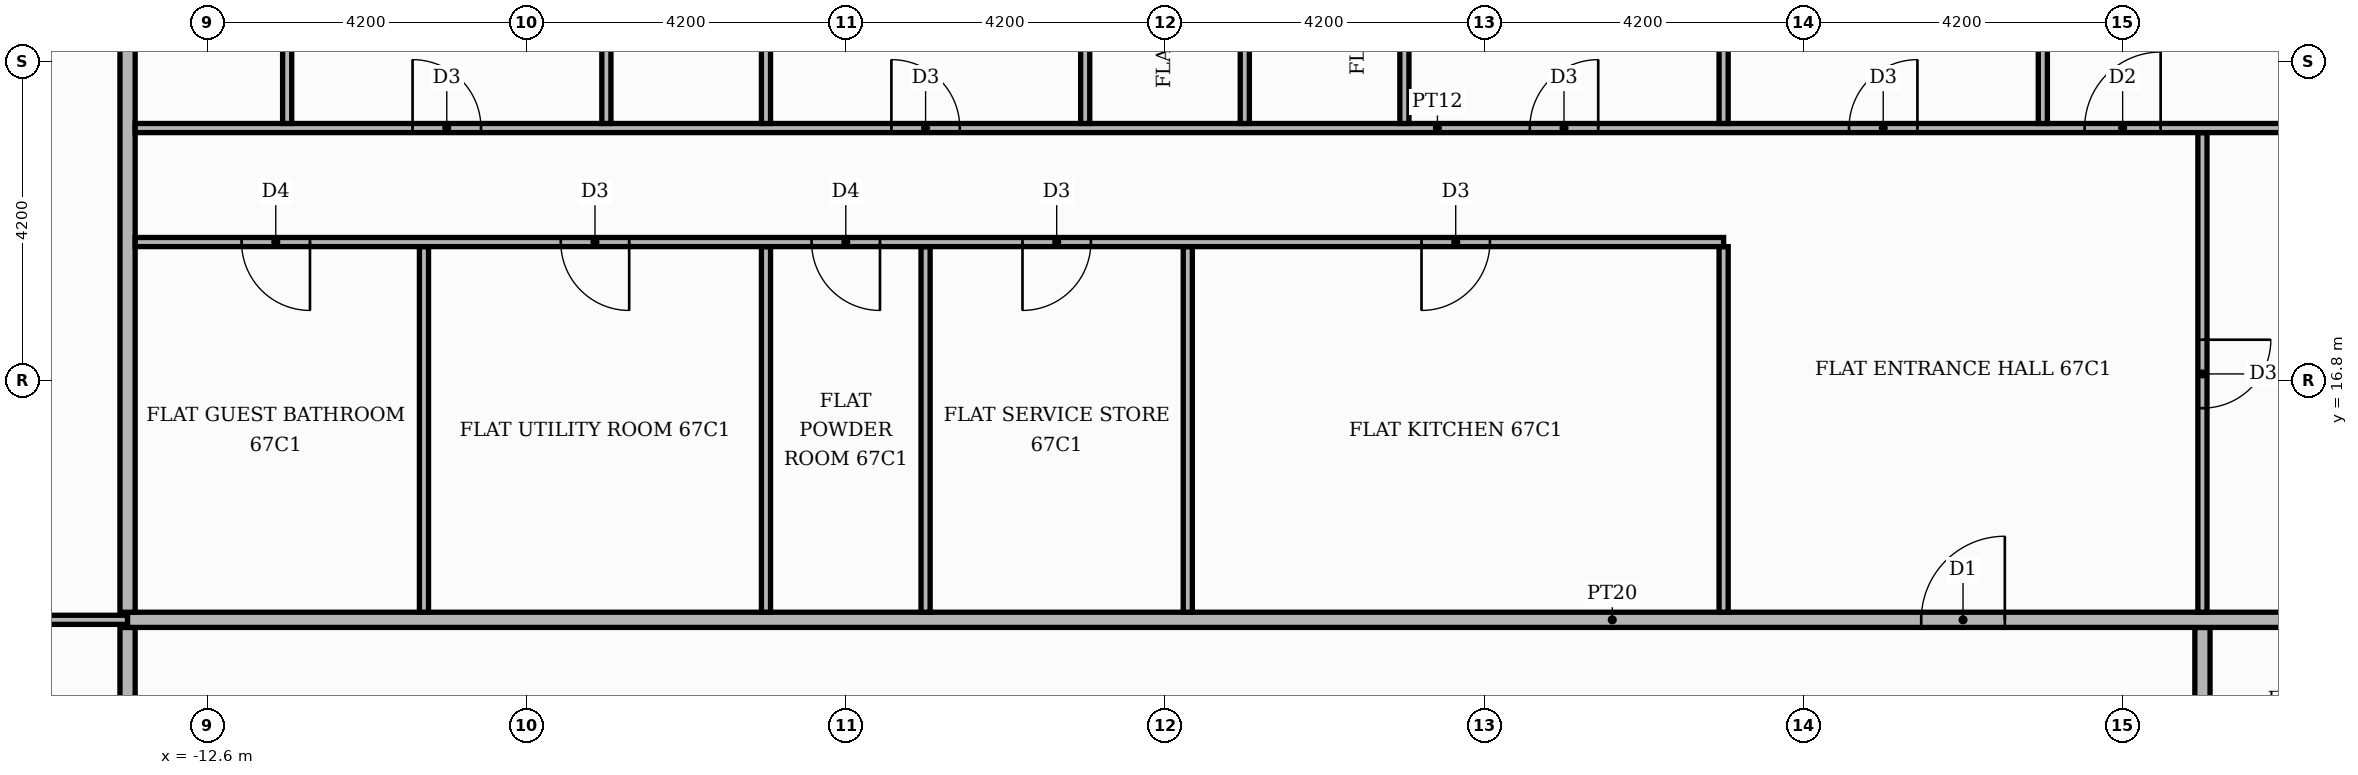
"""IFC4 building model, lengths in metres.
Left out: names, types, materials, properties, quantities, classifications, styles, units other than length and angle.
Written with IfcOpenShell. Run it as: python <this file> out.ifc"""

import sys

from ifc_helpers import new_model, si_unit, direction, frame, frame_2d, origin, place, context, subcontext, project, spatial, rectangle, extrude, element, fill, save


model = new_model("IFC4")
c1 = context("Model", 3, precision=1e-05, world=origin(), true_north=direction((0.0, 1.0)))
c2 = subcontext(c1, "Body", "Model", "MODEL_VIEW")
j1 = project(units=[si_unit("LENGTHUNIT", "METRE"), si_unit("PLANEANGLEUNIT", "RADIAN")], contexts=[c1])
p1 = place(None, origin())
s1 = spatial("IfcSite", under=j1, at=p1, CompositionType="ELEMENT")
p2 = place(p1, origin())
s2 = spatial("IfcBuilding", under=s1, at=p2, CompositionType="ELEMENT")
p3 = place(p2, frame((0.0, 0.0, 279.6)))
s3 = spatial("IfcBuildingStorey", under=s2, at=p3, CompositionType="ELEMENT", Elevation=279.6)
for number, where, z_axis, x_axis in (
    (1, (-13.65, 11.1, 0.0), (0.0, 0.0, 1.0), (0.0, 1.0, 0.0)),
    (2, (13.65, 11.1, 0.0), (0.0, 0.0, 1.0), (0.0, 1.0, 0.0)),
):
    element("IfcWall", number, at=place(p3, frame(where, z_axis=z_axis, x_axis=x_axis)), inside=s3, PredefinedType="PARTITIONING", context=c2, shape_type="SweptSolid", body=[
        extrude(rectangle(XDim=2.45, YDim=0.2, at=frame_2d((1.225, 0.0))), origin(), (0.0, 0.0, 1.0), 3.48),
    ])
p4 = place(p3, frame((-19.82, 13.65, 0.0), z_axis=(0.0, 0.0, 1.0), x_axis=(1.0, 0.0, 0.0)))
e3 = element("IfcWall", 3, at=p4, inside=s3, PredefinedType="PARTITIONING", context=c2, shape_type="SweptSolid", body=[
    extrude(rectangle(XDim=6.17, YDim=0.12, at=frame_2d((3.085, 0.0))), origin(), (0.0, 0.0, 1.0), 3.48),
])
p5 = place(p4, frame((2.635, 0.0, 0.0)))
e4 = element("IfcOpeningElement", 4, at=p5, cuts=e3, PredefinedType="OPENING", context=c2, shape_type="SweptSolid", body=[
    extrude(rectangle(XDim=0.9, YDim=2.1, at=frame_2d((0.45, 1.05))), frame((0.0, 0.07, 0.0), z_axis=(0.0, -1.0, 0.0), x_axis=(1.0, 0.0, 0.0)), (0.0, 0.0, 1.0), 0.14),
])
p6 = place(p3, frame((-13.65, 13.65, 0.0), z_axis=(0.0, 0.0, 1.0), x_axis=(1.0, 0.0, 0.0)))
e5 = element("IfcWall", 5, at=p6, inside=s3, PredefinedType="PARTITIONING", context=c2, shape_type="SweptSolid", body=[
    extrude(rectangle(XDim=39.07, YDim=0.2, at=frame_2d((19.535, 0.0))), origin(), (0.0, 0.0, 1.0), 3.48),
])
p7 = place(p6, frame((23.6, 0.0, 0.0)))
e6 = element("IfcOpeningElement", 6, at=p7, cuts=e5, PredefinedType="OPENING", context=c2, shape_type="SweptSolid", body=[
    extrude(rectangle(XDim=1.1, YDim=2.4, at=frame_2d((0.55, 1.2))), frame((0.0, 0.11, 0.0), z_axis=(0.0, -1.0, 0.0), x_axis=(1.0, 0.0, 0.0)), (0.0, 0.0, 1.0), 0.22),
])
p8 = place(p3, frame((-13.65, 13.75, 0.0), z_axis=(0.0, 0.0, 1.0), x_axis=(0.0, 1.0, 0.0)))
e7 = element("IfcWall", 7, at=p8, inside=s3, PredefinedType="PARTITIONING", context=c2, shape_type="SweptSolid", body=[
    extrude(rectangle(XDim=11.67, YDim=0.2, at=frame_2d((5.835, 0.0))), origin(), (0.0, 0.0, 1.0), 3.48),
])
for number, where, z_axis, x_axis in (
    (8, (-9.75, 13.75, 0.0), (0.0, 0.0, 1.0), (0.0, 1.0, 0.0)),
    (9, (-5.25, 13.75, 0.0), (0.0, 0.0, 1.0), (0.0, 1.0, 0.0)),
    (10, (-3.15, 13.75, 0.0), (0.0, 0.0, 1.0), (0.0, 1.0, 0.0)),
    (11, (0.3, 13.75, 0.0), (0.0, 0.0, 1.0), (0.0, 1.0, 0.0)),
    (12, (7.35, 13.75, 0.0), (0.0, 0.0, 1.0), (0.0, 1.0, 0.0)),
):
    element("IfcWall", number, at=place(p3, frame(where, z_axis=z_axis, x_axis=x_axis)), inside=s3, PredefinedType="PARTITIONING", context=c2, shape_type="SweptSolid", body=[
        extrude(rectangle(XDim=4.81, YDim=0.12, at=frame_2d((2.405, 0.0))), origin(), (0.0, 0.0, 1.0), 3.48),
    ])
p9 = place(p3, frame((13.65, 13.75, 0.0), z_axis=(0.0, 0.0, 1.0), x_axis=(0.0, 1.0, 0.0)))
e13 = element("IfcWall", 13, at=p9, inside=s3, PredefinedType="PARTITIONING", context=c2, shape_type="SweptSolid", body=[
    extrude(rectangle(XDim=6.31, YDim=0.12, at=frame_2d((3.155, 0.0))), origin(), (0.0, 0.0, 1.0), 3.48),
])
p10 = place(p9, frame((2.685, 0.0, 0.0)))
e14 = element("IfcOpeningElement", 14, at=p10, cuts=e13, PredefinedType="OPENING", context=c2, shape_type="SweptSolid", body=[
    extrude(rectangle(XDim=0.9, YDim=2.1, at=frame_2d((0.45, 1.05))), frame((0.0, 0.07, 0.0), z_axis=(0.0, -1.0, 0.0), x_axis=(1.0, 0.0, 0.0)), (0.0, 0.0, 1.0), 0.14),
])
p11 = place(p3, frame((-13.55, 18.62, 0.0), z_axis=(0.0, 0.0, 1.0), x_axis=(1.0, 0.0, 0.0)))
e15 = element("IfcWall", 15, at=p11, inside=s3, PredefinedType="PARTITIONING", context=c2, shape_type="SweptSolid", body=[
    extrude(rectangle(XDim=20.9, YDim=0.12, at=frame_2d((10.45, 0.0))), origin(), (0.0, 0.0, 1.0), 3.48),
])
p12 = place(p11, frame((16.925, 0.0, 0.0)))
e16 = element("IfcOpeningElement", 16, at=p12, cuts=e15, PredefinedType="OPENING", context=c2, shape_type="SweptSolid", body=[
    extrude(rectangle(XDim=0.9, YDim=2.1, at=frame_2d((0.45, 1.05))), frame((0.0, 0.07, 0.0), z_axis=(0.0, -1.0, 0.0), x_axis=(1.0, 0.0, 0.0)), (0.0, 0.0, 1.0), 0.14),
])
p13 = place(p11, frame((11.675, 0.0, 0.0)))
e17 = element("IfcOpeningElement", 17, at=p13, cuts=e15, PredefinedType="OPENING", context=c2, shape_type="SweptSolid", body=[
    extrude(rectangle(XDim=0.9, YDim=2.1, at=frame_2d((0.45, 1.05))), frame((0.0, 0.07, 0.0), z_axis=(0.0, -1.0, 0.0), x_axis=(1.0, 0.0, 0.0)), (0.0, 0.0, 1.0), 0.14),
])
p14 = place(p11, frame((8.9, 0.0, 0.0)))
e18 = element("IfcOpeningElement", 18, at=p14, cuts=e15, PredefinedType="OPENING", context=c2, shape_type="SweptSolid", body=[
    extrude(rectangle(XDim=0.9, YDim=2.1, at=frame_2d((0.45, 1.05))), frame((0.0, 0.07, 0.0), z_axis=(0.0, -1.0, 0.0), x_axis=(1.0, 0.0, 0.0)), (0.0, 0.0, 1.0), 0.14),
])
p15 = place(p11, frame((5.6, 0.0, 0.0)))
e19 = element("IfcOpeningElement", 19, at=p15, cuts=e15, PredefinedType="OPENING", context=c2, shape_type="SweptSolid", body=[
    extrude(rectangle(XDim=0.9, YDim=2.1, at=frame_2d((0.45, 1.05))), frame((0.0, 0.07, 0.0), z_axis=(0.0, -1.0, 0.0), x_axis=(1.0, 0.0, 0.0)), (0.0, 0.0, 1.0), 0.14),
])
p16 = place(p11, frame((1.4, 0.0, 0.0)))
e20 = element("IfcOpeningElement", 20, at=p16, cuts=e15, PredefinedType="OPENING", context=c2, shape_type="SweptSolid", body=[
    extrude(rectangle(XDim=0.9, YDim=2.1, at=frame_2d((0.45, 1.05))), frame((0.0, 0.07, 0.0), z_axis=(0.0, -1.0, 0.0), x_axis=(1.0, 0.0, 0.0)), (0.0, 0.0, 1.0), 0.14),
])
p17 = place(p3, frame((-13.55, 20.12, 0.0), z_axis=(0.0, 0.0, 1.0), x_axis=(1.0, 0.0, 0.0)))
e21 = element("IfcWall", 21, at=p17, inside=s3, PredefinedType="PARTITIONING", context=c2, shape_type="SweptSolid", body=[
    extrude(rectangle(XDim=34.269, YDim=0.12, at=frame_2d((17.135, 0.0))), origin(), (0.0, 0.0, 1.0), 3.48),
])
p18 = place(p17, frame((25.65, 0.0, 0.0)))
e22 = element("IfcOpeningElement", 22, at=p18, cuts=e21, PredefinedType="OPENING", context=c2, shape_type="SweptSolid", body=[
    extrude(rectangle(XDim=1.0, YDim=2.1, at=frame_2d((0.5, 1.05))), frame((0.0, 0.07, 0.0), z_axis=(0.0, -1.0, 0.0), x_axis=(1.0, 0.0, 0.0)), (0.0, 0.0, 1.0), 0.14),
])
p19 = place(p17, frame((22.55, 0.0, 0.0)))
e23 = element("IfcOpeningElement", 23, at=p19, cuts=e21, PredefinedType="OPENING", context=c2, shape_type="SweptSolid", body=[
    extrude(rectangle(XDim=0.9, YDim=2.1, at=frame_2d((0.45, 1.05))), frame((0.0, 0.07, 0.0), z_axis=(0.0, -1.0, 0.0), x_axis=(1.0, 0.0, 0.0)), (0.0, 0.0, 1.0), 0.14),
])
p20 = place(p17, frame((18.35, 0.0, 0.0)))
e24 = element("IfcOpeningElement", 24, at=p20, cuts=e21, PredefinedType="OPENING", context=c2, shape_type="SweptSolid", body=[
    extrude(rectangle(XDim=0.9, YDim=2.1, at=frame_2d((0.45, 1.05))), frame((0.0, 0.07, 0.0), z_axis=(0.0, -1.0, 0.0), x_axis=(1.0, 0.0, 0.0)), (0.0, 0.0, 1.0), 0.14),
])
p21 = place(p17, frame((9.95, 0.0, 0.0)))
e25 = element("IfcOpeningElement", 25, at=p21, cuts=e21, PredefinedType="OPENING", context=c2, shape_type="SweptSolid", body=[
    extrude(rectangle(XDim=0.9, YDim=2.1, at=frame_2d((0.45, 1.05))), frame((0.0, 0.07, 0.0), z_axis=(0.0, -1.0, 0.0), x_axis=(1.0, 0.0, 0.0)), (0.0, 0.0, 1.0), 0.14),
])
p22 = place(p17, frame((3.65, 0.0, 0.0)))
e26 = element("IfcOpeningElement", 26, at=p22, cuts=e21, PredefinedType="OPENING", context=c2, shape_type="SweptSolid", body=[
    extrude(rectangle(XDim=0.9, YDim=2.1, at=frame_2d((0.45, 1.05))), frame((0.0, 0.07, 0.0), z_axis=(0.0, -1.0, 0.0), x_axis=(1.0, 0.0, 0.0)), (0.0, 0.0, 1.0), 0.14),
])
p23 = place(p3, frame((-11.55, 20.18, 0.0), z_axis=(0.0, 0.0, 1.0), x_axis=(0.0, 1.0, 0.0)))
e27 = element("IfcWall", 27, at=p23, inside=s3, PredefinedType="PARTITIONING", context=c2, shape_type="SweptSolid", body=[
    extrude(rectangle(XDim=5.24, YDim=0.12, at=frame_2d((2.62, 0.0))), origin(), (0.0, 0.0, 1.0), 3.48),
])
p24 = place(p23, frame((2.29, 0.0, 0.0)))
e28 = element("IfcOpeningElement", 28, at=p24, cuts=e27, PredefinedType="OPENING", context=c2, shape_type="SweptSolid", body=[
    extrude(rectangle(XDim=0.9, YDim=2.1, at=frame_2d((0.45, 1.05))), frame((0.0, 0.07, 0.0), z_axis=(0.0, -1.0, 0.0), x_axis=(1.0, 0.0, 0.0)), (0.0, 0.0, 1.0), 0.14),
])
p25 = place(p3, frame((-7.35, 20.18, 0.0), z_axis=(0.0, 0.0, 1.0), x_axis=(0.0, 1.0, 0.0)))
e29 = element("IfcWall", 29, at=p25, inside=s3, PredefinedType="PARTITIONING", context=c2, shape_type="SweptSolid", body=[
    extrude(rectangle(XDim=5.24, YDim=0.12, at=frame_2d((2.62, 0.0))), origin(), (0.0, 0.0, 1.0), 3.48),
])
p26 = place(p3, frame((-5.25, 20.18, 0.0), z_axis=(0.0, 0.0, 1.0), x_axis=(0.0, 1.0, 0.0)))
e30 = element("IfcWall", 30, at=p26, inside=s3, PredefinedType="PARTITIONING", context=c2, shape_type="SweptSolid", body=[
    extrude(rectangle(XDim=5.24, YDim=0.12, at=frame_2d((2.62, 0.0))), origin(), (0.0, 0.0, 1.0), 3.48),
])
p27 = place(p26, frame((2.29, 0.0, 0.0)))
e31 = element("IfcOpeningElement", 31, at=p27, cuts=e30, PredefinedType="OPENING", context=c2, shape_type="SweptSolid", body=[
    extrude(rectangle(XDim=0.9, YDim=2.1, at=frame_2d((0.45, 1.05))), frame((0.0, 0.07, 0.0), z_axis=(0.0, -1.0, 0.0), x_axis=(1.0, 0.0, 0.0)), (0.0, 0.0, 1.0), 0.14),
])
p28 = place(p3, frame((-1.05, 20.18, 0.0), z_axis=(0.0, 0.0, 1.0), x_axis=(0.0, 1.0, 0.0)))
e32 = element("IfcWall", 32, at=p28, inside=s3, PredefinedType="PARTITIONING", context=c2, shape_type="SweptSolid", body=[
    extrude(rectangle(XDim=5.24, YDim=0.12, at=frame_2d((2.62, 0.0))), origin(), (0.0, 0.0, 1.0), 3.48),
])
p29 = place(p3, frame((1.05, 20.18, 0.0), z_axis=(0.0, 0.0, 1.0), x_axis=(0.0, 1.0, 0.0)))
e33 = element("IfcWall", 33, at=p29, inside=s3, PredefinedType="PARTITIONING", context=c2, shape_type="SweptSolid", body=[
    extrude(rectangle(XDim=5.24, YDim=0.12, at=frame_2d((2.62, 0.0))), origin(), (0.0, 0.0, 1.0), 3.48),
])
p30 = place(p29, frame((2.29, 0.0, 0.0)))
e34 = element("IfcOpeningElement", 34, at=p30, cuts=e33, PredefinedType="OPENING", context=c2, shape_type="SweptSolid", body=[
    extrude(rectangle(XDim=0.9, YDim=2.1, at=frame_2d((0.45, 1.05))), frame((0.0, 0.07, 0.0), z_axis=(0.0, -1.0, 0.0), x_axis=(1.0, 0.0, 0.0)), (0.0, 0.0, 1.0), 0.14),
])
p31 = place(p3, frame((3.15, 20.18, 0.0), z_axis=(0.0, 0.0, 1.0), x_axis=(0.0, 1.0, 0.0)))
e35 = element("IfcWall", 35, at=p31, inside=s3, PredefinedType="PARTITIONING", context=c2, shape_type="SweptSolid", body=[
    extrude(rectangle(XDim=5.24, YDim=0.12, at=frame_2d((2.62, 0.0))), origin(), (0.0, 0.0, 1.0), 3.48),
])
p32 = place(p31, frame((2.29, 0.0, 0.0)))
e36 = element("IfcOpeningElement", 36, at=p32, cuts=e35, PredefinedType="OPENING", context=c2, shape_type="SweptSolid", body=[
    extrude(rectangle(XDim=0.9, YDim=2.1, at=frame_2d((0.45, 1.05))), frame((0.0, 0.07, 0.0), z_axis=(0.0, -1.0, 0.0), x_axis=(1.0, 0.0, 0.0)), (0.0, 0.0, 1.0), 0.14),
])
for number, where, z_axis, x_axis in (
    (37, (7.35, 20.18, 0.0), (0.0, 0.0, 1.0), (0.0, 1.0, 0.0)),
    (38, (11.55, 20.18, 0.0), (0.0, 0.0, 1.0), (0.0, 1.0, 0.0)),
):
    element("IfcWall", number, at=place(p3, frame(where, z_axis=z_axis, x_axis=x_axis)), inside=s3, PredefinedType="PARTITIONING", context=c2, shape_type="SweptSolid", body=[
        extrude(rectangle(XDim=5.24, YDim=0.12, at=frame_2d((2.62, 0.0))), origin(), (0.0, 0.0, 1.0), 3.48),
    ])
p33 = place(p7, origin())
e39 = element("IfcDoor", 39, at=p33, inside=s3, OperationType="SINGLE_SWING_RIGHT", PredefinedType="DOOR", context=c2, shape_type="SweptSolid", body=[
    extrude(rectangle(XDim=1.1, YDim=2.4, at=frame_2d((0.55, 1.2))), frame((0.0, 0.025, 0.0), z_axis=(0.0, -1.0, 0.0), x_axis=(1.0, 0.0, 0.0)), (0.0, 0.0, 1.0), 0.05),
])
fill(e6, e39)
p34 = place(p10, frame((0.9, 0.0, 0.0), z_axis=(0.0, 0.0, 1.0), x_axis=(-1.0, 0.0, 0.0)))
e40 = element("IfcDoor", 40, at=p34, inside=s3, OperationType="SINGLE_SWING_RIGHT", PredefinedType="DOOR", context=c2, shape_type="SweptSolid", body=[
    extrude(rectangle(XDim=0.9, YDim=2.1, at=frame_2d((0.45, 1.05))), frame((0.0, 0.025, 0.0), z_axis=(0.0, -1.0, 0.0), x_axis=(1.0, 0.0, 0.0)), (0.0, 0.0, 1.0), 0.05),
])
fill(e14, e40)
p35 = place(p12, frame((0.9, 0.0, 0.0), z_axis=(0.0, 0.0, 1.0), x_axis=(-1.0, 0.0, 0.0)))
e41 = element("IfcDoor", 41, at=p35, inside=s3, OperationType="SINGLE_SWING_LEFT", PredefinedType="DOOR", context=c2, shape_type="SweptSolid", body=[
    extrude(rectangle(XDim=0.9, YDim=2.1, at=frame_2d((0.45, 1.05))), frame((0.0, 0.025, 0.0), z_axis=(0.0, -1.0, 0.0), x_axis=(1.0, 0.0, 0.0)), (0.0, 0.0, 1.0), 0.05),
])
fill(e16, e41)
p36 = place(p13, frame((0.9, 0.0, 0.0), z_axis=(0.0, 0.0, 1.0), x_axis=(-1.0, 0.0, 0.0)))
e42 = element("IfcDoor", 42, at=p36, inside=s3, OperationType="SINGLE_SWING_LEFT", PredefinedType="DOOR", context=c2, shape_type="SweptSolid", body=[
    extrude(rectangle(XDim=0.9, YDim=2.1, at=frame_2d((0.45, 1.05))), frame((0.0, 0.025, 0.0), z_axis=(0.0, -1.0, 0.0), x_axis=(1.0, 0.0, 0.0)), (0.0, 0.0, 1.0), 0.05),
])
fill(e17, e42)
p37 = place(p14, frame((0.9, 0.0, 0.0), z_axis=(0.0, 0.0, 1.0), x_axis=(-1.0, 0.0, 0.0)))
e43 = element("IfcDoor", 43, at=p37, inside=s3, OperationType="SINGLE_SWING_RIGHT", PredefinedType="DOOR", context=c2, shape_type="SweptSolid", body=[
    extrude(rectangle(XDim=0.9, YDim=2.1, at=frame_2d((0.45, 1.05))), frame((0.0, 0.025, 0.0), z_axis=(0.0, -1.0, 0.0), x_axis=(1.0, 0.0, 0.0)), (0.0, 0.0, 1.0), 0.05),
])
fill(e18, e43)
p38 = place(p15, frame((0.9, 0.0, 0.0), z_axis=(0.0, 0.0, 1.0), x_axis=(-1.0, 0.0, 0.0)))
e44 = element("IfcDoor", 44, at=p38, inside=s3, OperationType="SINGLE_SWING_RIGHT", PredefinedType="DOOR", context=c2, shape_type="SweptSolid", body=[
    extrude(rectangle(XDim=0.9, YDim=2.1, at=frame_2d((0.45, 1.05))), frame((0.0, 0.025, 0.0), z_axis=(0.0, -1.0, 0.0), x_axis=(1.0, 0.0, 0.0)), (0.0, 0.0, 1.0), 0.05),
])
fill(e19, e44)
p39 = place(p16, frame((0.9, 0.0, 0.0), z_axis=(0.0, 0.0, 1.0), x_axis=(-1.0, 0.0, 0.0)))
e45 = element("IfcDoor", 45, at=p39, inside=s3, OperationType="SINGLE_SWING_RIGHT", PredefinedType="DOOR", context=c2, shape_type="SweptSolid", body=[
    extrude(rectangle(XDim=0.9, YDim=2.1, at=frame_2d((0.45, 1.05))), frame((0.0, 0.025, 0.0), z_axis=(0.0, -1.0, 0.0), x_axis=(1.0, 0.0, 0.0)), (0.0, 0.0, 1.0), 0.05),
])
fill(e20, e45)
p40 = place(p18, origin())
e46 = element("IfcDoor", 46, at=p40, inside=s3, OperationType="SINGLE_SWING_RIGHT", PredefinedType="DOOR", context=c2, shape_type="SweptSolid", body=[
    extrude(rectangle(XDim=1.0, YDim=2.1, at=frame_2d((0.5, 1.05))), frame((0.0, 0.025, 0.0), z_axis=(0.0, -1.0, 0.0), x_axis=(1.0, 0.0, 0.0)), (0.0, 0.0, 1.0), 0.05),
])
fill(e22, e46)
p41 = place(p19, origin())
e47 = element("IfcDoor", 47, at=p41, inside=s3, OperationType="SINGLE_SWING_RIGHT", PredefinedType="DOOR", context=c2, shape_type="SweptSolid", body=[
    extrude(rectangle(XDim=0.9, YDim=2.1, at=frame_2d((0.45, 1.05))), frame((0.0, 0.025, 0.0), z_axis=(0.0, -1.0, 0.0), x_axis=(1.0, 0.0, 0.0)), (0.0, 0.0, 1.0), 0.05),
])
fill(e23, e47)
p42 = place(p20, origin())
e48 = element("IfcDoor", 48, at=p42, inside=s3, OperationType="SINGLE_SWING_RIGHT", PredefinedType="DOOR", context=c2, shape_type="SweptSolid", body=[
    extrude(rectangle(XDim=0.9, YDim=2.1, at=frame_2d((0.45, 1.05))), frame((0.0, 0.025, 0.0), z_axis=(0.0, -1.0, 0.0), x_axis=(1.0, 0.0, 0.0)), (0.0, 0.0, 1.0), 0.05),
])
fill(e24, e48)
p43 = place(p21, origin())
e49 = element("IfcDoor", 49, at=p43, inside=s3, OperationType="SINGLE_SWING_LEFT", PredefinedType="DOOR", context=c2, shape_type="SweptSolid", body=[
    extrude(rectangle(XDim=0.9, YDim=2.1, at=frame_2d((0.45, 1.05))), frame((0.0, 0.025, 0.0), z_axis=(0.0, -1.0, 0.0), x_axis=(1.0, 0.0, 0.0)), (0.0, 0.0, 1.0), 0.05),
])
fill(e25, e49)
p44 = place(p22, origin())
e50 = element("IfcDoor", 50, at=p44, inside=s3, OperationType="SINGLE_SWING_LEFT", PredefinedType="DOOR", context=c2, shape_type="SweptSolid", body=[
    extrude(rectangle(XDim=0.9, YDim=2.1, at=frame_2d((0.45, 1.05))), frame((0.0, 0.025, 0.0), z_axis=(0.0, -1.0, 0.0), x_axis=(1.0, 0.0, 0.0)), (0.0, 0.0, 1.0), 0.05),
])
fill(e26, e50)
save(model, sys.argv[1])
